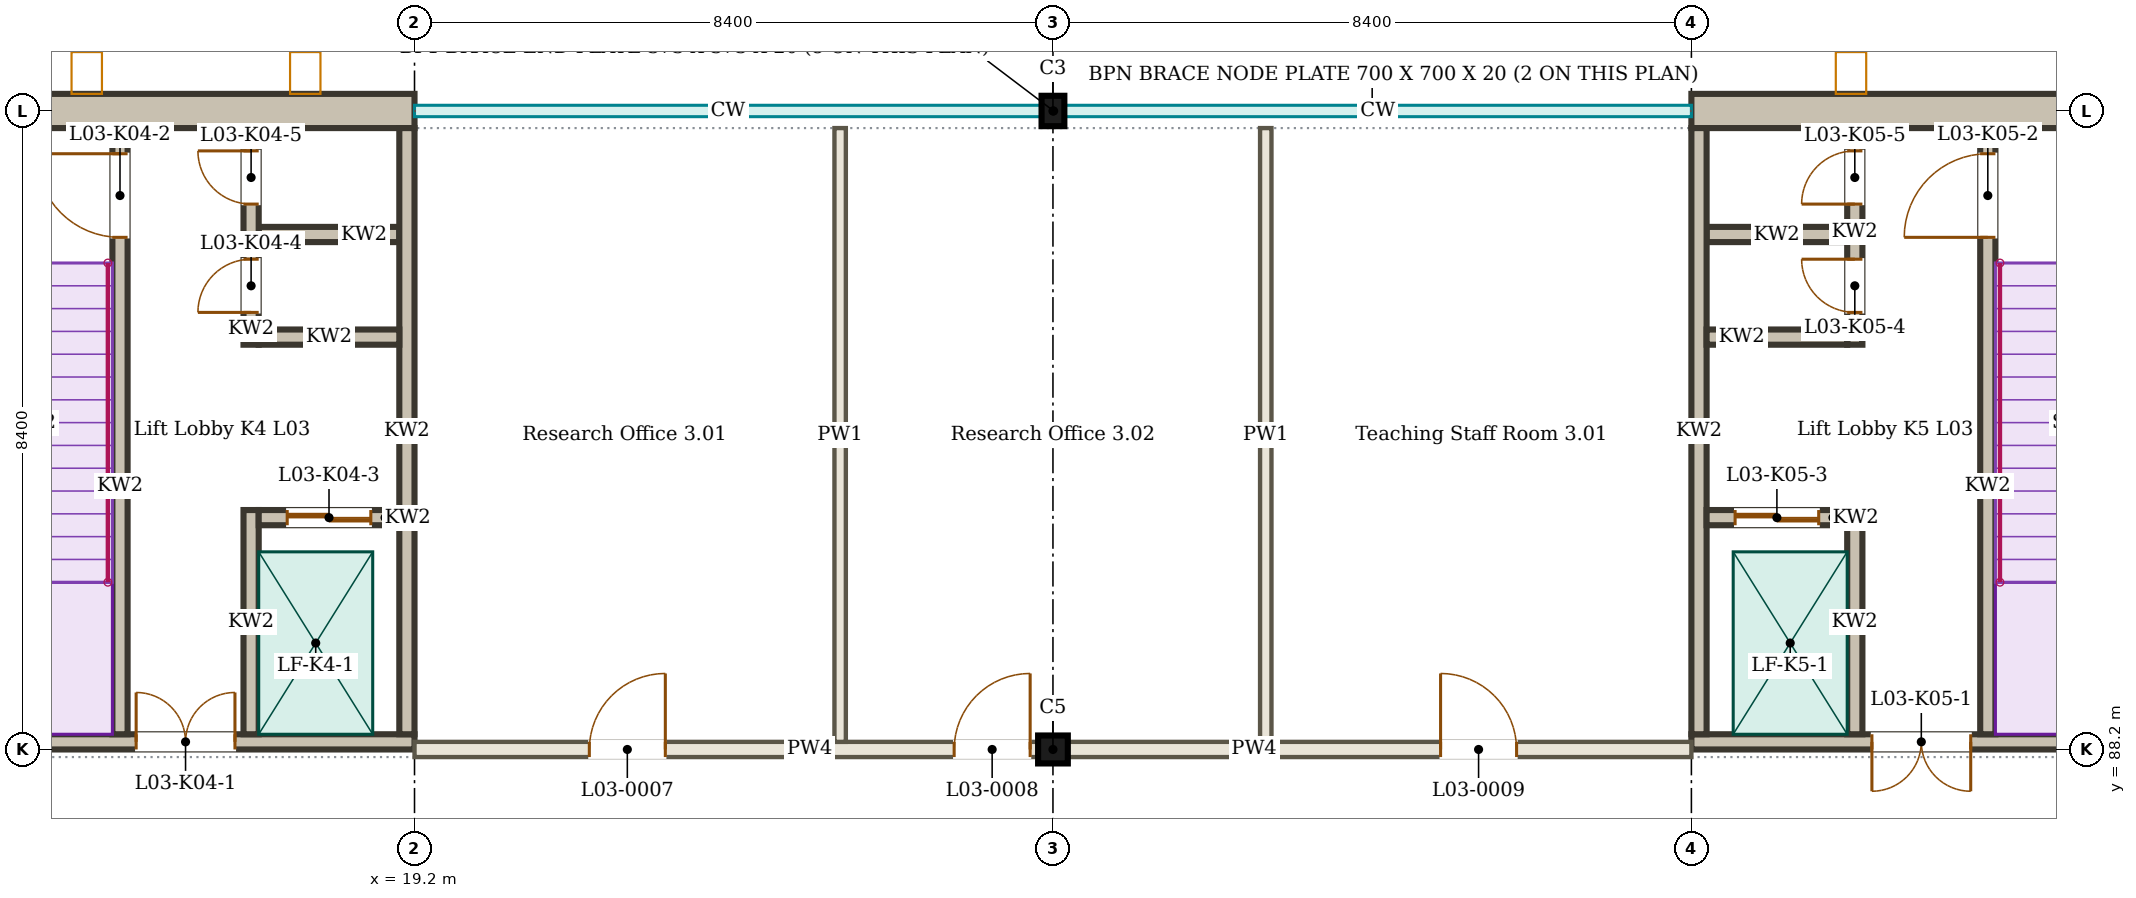
"""IFC4 building model, lengths in metres.
Left out: names, types, materials, properties, quantities, classifications, styles, units other than length and angle.
Written with IfcOpenShell. Run it as: python <this file> out.ifc"""

import sys

from ifc_helpers import new_model, si_unit, direction, frame, frame_2d, origin, origin_2d, place, context, subcontext, project, spatial, rectangle, i_section, extrude, element, fill, save


model = new_model("IFC4")
c1 = context("Model", 3, precision=1e-05, world=origin(), true_north=direction((0.0, 1.0)))
c2 = subcontext(c1, "Body", "Model", "MODEL_VIEW")
j1 = project(units=[si_unit("LENGTHUNIT", "METRE"), si_unit("PLANEANGLEUNIT", "RADIAN")], contexts=[c1])
p1 = place(None, origin())
s1 = spatial("IfcSite", under=j1, at=p1, CompositionType="ELEMENT")
p2 = place(p1, origin())
s2 = spatial("IfcBuilding", under=s1, at=p2, CompositionType="ELEMENT")
p3 = place(p2, frame((0.0, 0.0, 13.5)))
s3 = spatial("IfcBuildingStorey", under=s2, at=p3, CompositionType="ELEMENT", Elevation=13.5)
p4 = place(p3, frame((27.6, 88.2, 0.0), z_axis=(0.0, 0.0, 1.0), x_axis=(1.0, 0.0, 0.0)))
e1 = element("IfcColumn", 1, at=p4, inside=s3, PredefinedType="COLUMN", context=c2, shape_type="SweptSolid", body=[
    extrude(i_section(OverallWidth=0.391, OverallDepth=0.368, WebThickness=0.015, FlangeThickness=0.024, FilletRadius=0.027, at=origin_2d()), origin(), (0.0, 0.0, 1.0), 4.5),
])
p5 = place(p3, frame((27.6, 96.6, 0.0), z_axis=(0.0, 0.0, 1.0), x_axis=(1.0, 0.0, 0.0)))
e2 = element("IfcColumn", 2, at=p5, inside=s3, PredefinedType="COLUMN", context=c2, shape_type="SweptSolid", body=[
    extrude(i_section(OverallWidth=0.3, OverallDepth=0.4, WebThickness=0.013, FlangeThickness=0.024, FilletRadius=0.027, at=origin_2d()), origin(), (0.0, 0.0, 1.0), 4.5),
])
p6 = place(p3, frame((19.2, 88.2, 0.0), z_axis=(0.0, 0.0, 1.0), x_axis=(1.0, 0.0, 0.0)))
e3 = element("IfcWall", 3, at=p6, inside=s3, PredefinedType="PARTITIONING", context=c2, shape_type="SweptSolid", body=[
    extrude(rectangle(XDim=8.205, YDim=0.2, at=frame_2d((4.102, 0.0))), origin(), (0.0, 0.0, 1.0), 3.8),
])
p7 = place(p6, frame((2.3, 0.0, 0.0)))
e4 = element("IfcOpeningElement", 4, at=p7, cuts=e3, PredefinedType="OPENING", context=c2, shape_type="SweptSolid", body=[
    extrude(rectangle(XDim=1.0, YDim=2.1, at=frame_2d((0.5, 1.05))), frame((0.0, 0.11, 0.0), z_axis=(0.0, -1.0, 0.0), x_axis=(1.0, 0.0, 0.0)), (0.0, 0.0, 1.0), 0.22),
])
p8 = place(p6, frame((7.1, 0.0, 0.0)))
e5 = element("IfcOpeningElement", 5, at=p8, cuts=e3, PredefinedType="OPENING", context=c2, shape_type="SweptSolid", body=[
    extrude(rectangle(XDim=1.0, YDim=2.1, at=frame_2d((0.5, 1.05))), frame((0.0, 0.11, 0.0), z_axis=(0.0, -1.0, 0.0), x_axis=(1.0, 0.0, 0.0)), (0.0, 0.0, 1.0), 0.22),
])
p9 = place(p3, frame((27.795, 88.2, 0.0), z_axis=(0.0, 0.0, 1.0), x_axis=(1.0, 0.0, 0.0)))
e6 = element("IfcWall", 6, at=p9, inside=s3, PredefinedType="PARTITIONING", context=c2, shape_type="SweptSolid", body=[
    extrude(rectangle(XDim=8.205, YDim=0.2, at=frame_2d((4.102, 0.0))), origin(), (0.0, 0.0, 1.0), 3.8),
])
p10 = place(p9, frame((4.905, 0.0, 0.0)))
e7 = element("IfcOpeningElement", 7, at=p10, cuts=e6, PredefinedType="OPENING", context=c2, shape_type="SweptSolid", body=[
    extrude(rectangle(XDim=1.0, YDim=2.1, at=frame_2d((0.5, 1.05))), frame((0.0, 0.11, 0.0), z_axis=(0.0, -1.0, 0.0), x_axis=(1.0, 0.0, 0.0)), (0.0, 0.0, 1.0), 0.22),
])
for number, where, z_axis, x_axis in (
    (8, (24.8, 88.3, 0.0), (0.0, 0.0, 1.0), (0.0, 1.0, 0.0)),
    (9, (30.4, 88.3, 0.0), (0.0, 0.0, 1.0), (0.0, 1.0, 0.0)),
):
    element("IfcWall", number, at=place(p3, frame(where, z_axis=z_axis, x_axis=x_axis)), inside=s3, PredefinedType="PARTITIONING", context=c2, shape_type="SweptSolid", body=[
        extrude(rectangle(XDim=8.075, YDim=0.15, at=frame_2d((4.038, 0.0))), origin(), (0.0, 0.0, 1.0), 3.8),
    ])
p11 = place(p3, frame((11.025, 88.3, 0.0), z_axis=(0.0, 0.0, 1.0), x_axis=(1.0, 0.0, 0.0)))
e10 = element("IfcWall", 10, at=p11, inside=s3, PredefinedType="SOLIDWALL", context=c2, shape_type="SweptSolid", body=[
    extrude(rectangle(XDim=8.175, YDim=0.2, at=frame_2d((4.087, 0.0))), origin(), (0.0, 0.0, 1.0), 4.5),
])
p12 = place(p11, frame((4.512, 0.0, 0.0)))
e11 = element("IfcOpeningElement", 11, at=p12, cuts=e10, PredefinedType="OPENING", context=c2, shape_type="SweptSolid", body=[
    extrude(rectangle(XDim=1.3, YDim=2.1, at=frame_2d((0.65, 1.05))), frame((0.0, 0.11, 0.0), z_axis=(0.0, -1.0, 0.0), x_axis=(1.0, 0.0, 0.0)), (0.0, 0.0, 1.0), 0.22),
])
p13 = place(p3, frame((10.575, 96.6, 0.0), z_axis=(0.0, 0.0, 1.0), x_axis=(1.0, 0.0, 0.0)))
e12 = element("IfcWall", 12, at=p13, inside=s3, PredefinedType="SOLIDWALL", context=c2, shape_type="SweptSolid", body=[
    extrude(rectangle(XDim=8.625, YDim=0.45, at=frame_2d((4.312, 0.0))), origin(), (0.0, 0.0, 1.0), 4.5),
])
p14 = place(p3, frame((19.1, 88.4, 0.0), z_axis=(0.0, 0.0, 1.0), x_axis=(0.0, 1.0, 0.0)))
e13 = element("IfcWall", 13, at=p14, inside=s3, PredefinedType="SOLIDWALL", context=c2, shape_type="SweptSolid", body=[
    extrude(rectangle(XDim=7.975, YDim=0.2, at=frame_2d((3.988, 0.0))), origin(), (0.0, 0.0, 1.0), 4.5),
])
p15 = place(p3, frame((15.325, 88.4, 0.0), z_axis=(0.0, 0.0, 1.0), x_axis=(0.0, 1.0, 0.0)))
e14 = element("IfcWall", 14, at=p15, inside=s3, PredefinedType="SOLIDWALL", context=c2, shape_type="SweptSolid", body=[
    extrude(rectangle(XDim=7.975, YDim=0.2, at=frame_2d((3.988, 0.0))), origin(), (0.0, 0.0, 1.0), 4.5),
])
p16 = place(p15, frame((6.538, 0.0, 0.0)))
e15 = element("IfcOpeningElement", 15, at=p16, cuts=e14, PredefinedType="OPENING", context=c2, shape_type="SweptSolid", body=[
    extrude(rectangle(XDim=1.1, YDim=2.1, at=frame_2d((0.55, 1.05))), frame((0.0, 0.11, 0.0), z_axis=(0.0, -1.0, 0.0), x_axis=(1.0, 0.0, 0.0)), (0.0, 0.0, 1.0), 0.22),
])
p17 = place(p3, frame((17.05, 88.4, 0.0), z_axis=(0.0, 0.0, 1.0), x_axis=(0.0, 1.0, 0.0)))
e16 = element("IfcWall", 16, at=p17, inside=s3, PredefinedType="SOLIDWALL", context=c2, shape_type="SweptSolid", body=[
    extrude(rectangle(XDim=2.95, YDim=0.2, at=frame_2d((1.475, 0.0))), origin(), (0.0, 0.0, 1.0), 4.5),
])
p18 = place(p3, frame((17.05, 93.525, 0.0), z_axis=(0.0, 0.0, 1.0), x_axis=(0.0, 1.0, 0.0)))
e17 = element("IfcWall", 17, at=p18, inside=s3, PredefinedType="SOLIDWALL", context=c2, shape_type="SweptSolid", body=[
    extrude(rectangle(XDim=2.85, YDim=0.2, at=frame_2d((1.425, 0.0))), origin(), (0.0, 0.0, 1.0), 4.35),
])
p19 = place(p18, frame((0.425, 0.0, 0.0)))
e18 = element("IfcOpeningElement", 18, at=p19, cuts=e17, PredefinedType="OPENING", context=c2, shape_type="SweptSolid", body=[
    extrude(rectangle(XDim=0.7, YDim=2.1, at=frame_2d((0.35, 1.05))), frame((0.0, 0.11, 0.0), z_axis=(0.0, -1.0, 0.0), x_axis=(1.0, 0.0, 0.0)), (0.0, 0.0, 1.0), 0.22),
])
p20 = place(p18, frame((1.85, 0.0, 0.0)))
e19 = element("IfcOpeningElement", 19, at=p20, cuts=e17, PredefinedType="OPENING", context=c2, shape_type="SweptSolid", body=[
    extrude(rectangle(XDim=0.7, YDim=2.1, at=frame_2d((0.35, 1.05))), frame((0.0, 0.11, 0.0), z_axis=(0.0, -1.0, 0.0), x_axis=(1.0, 0.0, 0.0)), (0.0, 0.0, 1.0), 0.22),
])
p21 = place(p3, frame((17.15, 91.25, 0.0), z_axis=(0.0, 0.0, 1.0), x_axis=(1.0, 0.0, 0.0)))
e20 = element("IfcWall", 20, at=p21, inside=s3, PredefinedType="SOLIDWALL", context=c2, shape_type="SweptSolid", body=[
    extrude(rectangle(XDim=1.85, YDim=0.2, at=frame_2d((0.925, 0.0))), origin(), (0.0, 0.0, 1.0), 4.5),
])
p22 = place(p21, frame((0.375, 0.0, 0.0)))
e21 = element("IfcOpeningElement", 21, at=p22, cuts=e20, PredefinedType="OPENING", context=c2, shape_type="SweptSolid", body=[
    extrude(rectangle(XDim=1.1, YDim=2.1, at=frame_2d((0.55, 1.05))), frame((0.0, 0.11, 0.0), z_axis=(0.0, -1.0, 0.0), x_axis=(1.0, 0.0, 0.0)), (0.0, 0.0, 1.0), 0.22),
])
for number, where, z_axis, x_axis in (
    (22, (17.15, 93.625, 0.0), (0.0, 0.0, 1.0), (1.0, 0.0, 0.0)),
    (23, (17.15, 94.975, 0.0), (0.0, 0.0, 1.0), (1.0, 0.0, 0.0)),
):
    element("IfcWall", number, at=place(p3, frame(where, z_axis=z_axis, x_axis=x_axis)), inside=s3, PredefinedType="SOLIDWALL", context=c2, shape_type="SweptSolid", body=[
        extrude(rectangle(XDim=1.85, YDim=0.2, at=frame_2d((0.925, 0.0))), origin(), (0.0, 0.0, 1.0), 4.35),
    ])
p23 = place(p3, frame((44.4, 88.3, 0.0), z_axis=(0.0, 0.0, 1.0), x_axis=(-1.0, 0.0, 0.0)))
e24 = element("IfcWall", 24, at=p23, inside=s3, PredefinedType="SOLIDWALL", context=c2, shape_type="SweptSolid", body=[
    extrude(rectangle(XDim=8.4, YDim=0.2, at=frame_2d((4.2, 0.0))), origin(), (0.0, 0.0, 1.0), 4.5),
])
p24 = place(p23, frame((4.725, 0.0, 0.0)))
e25 = element("IfcOpeningElement", 25, at=p24, cuts=e24, PredefinedType="OPENING", context=c2, shape_type="SweptSolid", body=[
    extrude(rectangle(XDim=1.3, YDim=2.1, at=frame_2d((0.65, 1.05))), frame((0.0, 0.11, 0.0), z_axis=(0.0, -1.0, 0.0), x_axis=(1.0, 0.0, 0.0)), (0.0, 0.0, 1.0), 0.22),
])
p25 = place(p3, frame((44.4, 96.6, 0.0), z_axis=(0.0, 0.0, 1.0), x_axis=(-1.0, 0.0, 0.0)))
e26 = element("IfcWall", 26, at=p25, inside=s3, PredefinedType="SOLIDWALL", context=c2, shape_type="SweptSolid", body=[
    extrude(rectangle(XDim=8.4, YDim=0.45, at=frame_2d((4.2, 0.0))), origin(), (0.0, 0.0, 1.0), 4.5),
])
p26 = place(p3, frame((36.1, 88.4, 0.0), z_axis=(0.0, 0.0, 1.0), x_axis=(0.0, 1.0, 0.0)))
e27 = element("IfcWall", 27, at=p26, inside=s3, PredefinedType="SOLIDWALL", context=c2, shape_type="SweptSolid", body=[
    extrude(rectangle(XDim=7.975, YDim=0.2, at=frame_2d((3.988, 0.0))), origin(), (0.0, 0.0, 1.0), 4.5),
])
p27 = place(p3, frame((39.9, 88.4, 0.0), z_axis=(0.0, 0.0, 1.0), x_axis=(0.0, 1.0, 0.0)))
e28 = element("IfcWall", 28, at=p27, inside=s3, PredefinedType="SOLIDWALL", context=c2, shape_type="SweptSolid", body=[
    extrude(rectangle(XDim=7.975, YDim=0.2, at=frame_2d((3.988, 0.0))), origin(), (0.0, 0.0, 1.0), 4.5),
])
p28 = place(p27, frame((6.538, 0.0, 0.0)))
e29 = element("IfcOpeningElement", 29, at=p28, cuts=e28, PredefinedType="OPENING", context=c2, shape_type="SweptSolid", body=[
    extrude(rectangle(XDim=1.1, YDim=2.1, at=frame_2d((0.55, 1.05))), frame((0.0, 0.11, 0.0), z_axis=(0.0, -1.0, 0.0), x_axis=(1.0, 0.0, 0.0)), (0.0, 0.0, 1.0), 0.22),
])
p29 = place(p3, frame((38.15, 88.4, 0.0), z_axis=(0.0, 0.0, 1.0), x_axis=(0.0, 1.0, 0.0)))
e30 = element("IfcWall", 30, at=p29, inside=s3, PredefinedType="SOLIDWALL", context=c2, shape_type="SweptSolid", body=[
    extrude(rectangle(XDim=2.95, YDim=0.2, at=frame_2d((1.475, 0.0))), origin(), (0.0, 0.0, 1.0), 4.5),
])
p30 = place(p3, frame((38.15, 93.525, 0.0), z_axis=(0.0, 0.0, 1.0), x_axis=(0.0, 1.0, 0.0)))
e31 = element("IfcWall", 31, at=p30, inside=s3, PredefinedType="SOLIDWALL", context=c2, shape_type="SweptSolid", body=[
    extrude(rectangle(XDim=2.85, YDim=0.2, at=frame_2d((1.425, 0.0))), origin(), (0.0, 0.0, 1.0), 4.35),
])
p31 = place(p30, frame((0.425, 0.0, 0.0)))
e32 = element("IfcOpeningElement", 32, at=p31, cuts=e31, PredefinedType="OPENING", context=c2, shape_type="SweptSolid", body=[
    extrude(rectangle(XDim=0.7, YDim=2.1, at=frame_2d((0.35, 1.05))), frame((0.0, 0.11, 0.0), z_axis=(0.0, -1.0, 0.0), x_axis=(1.0, 0.0, 0.0)), (0.0, 0.0, 1.0), 0.22),
])
p32 = place(p30, frame((1.85, 0.0, 0.0)))
e33 = element("IfcOpeningElement", 33, at=p32, cuts=e31, PredefinedType="OPENING", context=c2, shape_type="SweptSolid", body=[
    extrude(rectangle(XDim=0.7, YDim=2.1, at=frame_2d((0.35, 1.05))), frame((0.0, 0.11, 0.0), z_axis=(0.0, -1.0, 0.0), x_axis=(1.0, 0.0, 0.0)), (0.0, 0.0, 1.0), 0.22),
])
p33 = place(p3, frame((38.05, 91.25, 0.0), z_axis=(0.0, 0.0, 1.0), x_axis=(-1.0, 0.0, 0.0)))
e34 = element("IfcWall", 34, at=p33, inside=s3, PredefinedType="SOLIDWALL", context=c2, shape_type="SweptSolid", body=[
    extrude(rectangle(XDim=1.85, YDim=0.2, at=frame_2d((0.925, 0.0))), origin(), (0.0, 0.0, 1.0), 4.5),
])
p34 = place(p33, frame((0.375, 0.0, 0.0)))
e35 = element("IfcOpeningElement", 35, at=p34, cuts=e34, PredefinedType="OPENING", context=c2, shape_type="SweptSolid", body=[
    extrude(rectangle(XDim=1.1, YDim=2.1, at=frame_2d((0.55, 1.05))), frame((0.0, 0.11, 0.0), z_axis=(0.0, -1.0, 0.0), x_axis=(1.0, 0.0, 0.0)), (0.0, 0.0, 1.0), 0.22),
])
for number, where, z_axis, x_axis in (
    (36, (38.05, 93.625, 0.0), (0.0, 0.0, 1.0), (-1.0, 0.0, 0.0)),
    (37, (38.05, 94.975, 0.0), (0.0, 0.0, 1.0), (-1.0, 0.0, 0.0)),
):
    element("IfcWall", number, at=place(p3, frame(where, z_axis=z_axis, x_axis=x_axis)), inside=s3, PredefinedType="SOLIDWALL", context=c2, shape_type="SweptSolid", body=[
        extrude(rectangle(XDim=1.85, YDim=0.2, at=frame_2d((0.925, 0.0))), origin(), (0.0, 0.0, 1.0), 4.35),
    ])
p35 = place(p7, origin())
e38 = element("IfcDoor", 38, at=p35, inside=s3, OperationType="SINGLE_SWING_RIGHT", PredefinedType="DOOR", context=c2, shape_type="SweptSolid", body=[
    extrude(rectangle(XDim=1.0, YDim=2.1, at=frame_2d((0.5, 1.05))), frame((0.0, 0.025, 0.0), z_axis=(0.0, -1.0, 0.0), x_axis=(1.0, 0.0, 0.0)), (0.0, 0.0, 1.0), 0.05),
])
fill(e4, e38)
p36 = place(p8, origin())
e39 = element("IfcDoor", 39, at=p36, inside=s3, OperationType="SINGLE_SWING_RIGHT", PredefinedType="DOOR", context=c2, shape_type="SweptSolid", body=[
    extrude(rectangle(XDim=1.0, YDim=2.1, at=frame_2d((0.5, 1.05))), frame((0.0, 0.025, 0.0), z_axis=(0.0, -1.0, 0.0), x_axis=(1.0, 0.0, 0.0)), (0.0, 0.0, 1.0), 0.05),
])
fill(e5, e39)
p37 = place(p10, origin())
e40 = element("IfcDoor", 40, at=p37, inside=s3, OperationType="SINGLE_SWING_LEFT", PredefinedType="DOOR", context=c2, shape_type="SweptSolid", body=[
    extrude(rectangle(XDim=1.0, YDim=2.1, at=frame_2d((0.5, 1.05))), frame((0.0, 0.025, 0.0), z_axis=(0.0, -1.0, 0.0), x_axis=(1.0, 0.0, 0.0)), (0.0, 0.0, 1.0), 0.05),
])
fill(e7, e40)
p38 = place(p12, origin())
e41 = element("IfcDoor", 41, at=p38, inside=s3, OperationType="DOUBLE_DOOR_DOUBLE_SWING", PredefinedType="DOOR", context=c2, shape_type="SweptSolid", body=[
    extrude(rectangle(XDim=1.3, YDim=2.1, at=frame_2d((0.65, 1.05))), frame((0.0, 0.025, 0.0), z_axis=(0.0, -1.0, 0.0), x_axis=(1.0, 0.0, 0.0)), (0.0, 0.0, 1.0), 0.05),
])
fill(e11, e41)
p39 = place(p16, origin())
e42 = element("IfcDoor", 42, at=p39, inside=s3, OperationType="SINGLE_SWING_RIGHT", PredefinedType="DOOR", context=c2, shape_type="SweptSolid", body=[
    extrude(rectangle(XDim=1.1, YDim=2.1, at=frame_2d((0.55, 1.05))), frame((0.0, 0.025, 0.0), z_axis=(0.0, -1.0, 0.0), x_axis=(1.0, 0.0, 0.0)), (0.0, 0.0, 1.0), 0.05),
])
fill(e15, e42)
p40 = place(p22, origin())
e43 = element("IfcDoor", 43, at=p40, inside=s3, OperationType="DOUBLE_DOOR_SLIDING", PredefinedType="DOOR", context=c2, shape_type="SweptSolid", body=[
    extrude(rectangle(XDim=1.1, YDim=2.1, at=frame_2d((0.55, 1.05))), frame((0.0, 0.025, 0.0), z_axis=(0.0, -1.0, 0.0), x_axis=(1.0, 0.0, 0.0)), (0.0, 0.0, 1.0), 0.05),
])
fill(e21, e43)
p41 = place(p19, origin())
e44 = element("IfcDoor", 44, at=p41, inside=s3, OperationType="SINGLE_SWING_LEFT", PredefinedType="DOOR", context=c2, shape_type="SweptSolid", body=[
    extrude(rectangle(XDim=0.7, YDim=2.1, at=frame_2d((0.35, 1.05))), frame((0.0, 0.025, 0.0), z_axis=(0.0, -1.0, 0.0), x_axis=(1.0, 0.0, 0.0)), (0.0, 0.0, 1.0), 0.05),
])
fill(e18, e44)
p42 = place(p20, origin())
e45 = element("IfcDoor", 45, at=p42, inside=s3, OperationType="SINGLE_SWING_RIGHT", PredefinedType="DOOR", context=c2, shape_type="SweptSolid", body=[
    extrude(rectangle(XDim=0.7, YDim=2.1, at=frame_2d((0.35, 1.05))), frame((0.0, 0.025, 0.0), z_axis=(0.0, -1.0, 0.0), x_axis=(1.0, 0.0, 0.0)), (0.0, 0.0, 1.0), 0.05),
])
fill(e19, e45)
p43 = place(p24, origin())
e46 = element("IfcDoor", 46, at=p43, inside=s3, OperationType="DOUBLE_DOOR_DOUBLE_SWING", PredefinedType="DOOR", context=c2, shape_type="SweptSolid", body=[
    extrude(rectangle(XDim=1.3, YDim=2.1, at=frame_2d((0.65, 1.05))), frame((0.0, 0.025, 0.0), z_axis=(0.0, -1.0, 0.0), x_axis=(1.0, 0.0, 0.0)), (0.0, 0.0, 1.0), 0.05),
])
fill(e25, e46)
p44 = place(p28, origin())
e47 = element("IfcDoor", 47, at=p44, inside=s3, OperationType="SINGLE_SWING_LEFT", PredefinedType="DOOR", context=c2, shape_type="SweptSolid", body=[
    extrude(rectangle(XDim=1.1, YDim=2.1, at=frame_2d((0.55, 1.05))), frame((0.0, 0.025, 0.0), z_axis=(0.0, -1.0, 0.0), x_axis=(1.0, 0.0, 0.0)), (0.0, 0.0, 1.0), 0.05),
])
fill(e29, e47)
p45 = place(p34, origin())
e48 = element("IfcDoor", 48, at=p45, inside=s3, OperationType="DOUBLE_DOOR_SLIDING", PredefinedType="DOOR", context=c2, shape_type="SweptSolid", body=[
    extrude(rectangle(XDim=1.1, YDim=2.1, at=frame_2d((0.55, 1.05))), frame((0.0, 0.025, 0.0), z_axis=(0.0, -1.0, 0.0), x_axis=(1.0, 0.0, 0.0)), (0.0, 0.0, 1.0), 0.05),
])
fill(e35, e48)
p46 = place(p31, origin())
e49 = element("IfcDoor", 49, at=p46, inside=s3, OperationType="SINGLE_SWING_RIGHT", PredefinedType="DOOR", context=c2, shape_type="SweptSolid", body=[
    extrude(rectangle(XDim=0.7, YDim=2.1, at=frame_2d((0.35, 1.05))), frame((0.0, 0.025, 0.0), z_axis=(0.0, -1.0, 0.0), x_axis=(1.0, 0.0, 0.0)), (0.0, 0.0, 1.0), 0.05),
])
fill(e32, e49)
p47 = place(p32, origin())
e50 = element("IfcDoor", 50, at=p47, inside=s3, OperationType="SINGLE_SWING_LEFT", PredefinedType="DOOR", context=c2, shape_type="SweptSolid", body=[
    extrude(rectangle(XDim=0.7, YDim=2.1, at=frame_2d((0.35, 1.05))), frame((0.0, 0.025, 0.0), z_axis=(0.0, -1.0, 0.0), x_axis=(1.0, 0.0, 0.0)), (0.0, 0.0, 1.0), 0.05),
])
fill(e33, e50)
save(model, sys.argv[1])
